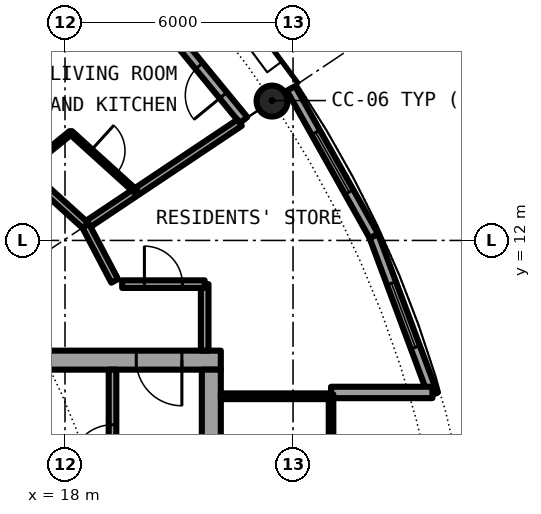
"""IFC4 building model, lengths in metres.
Left out: names, types, materials, properties, quantities, classifications, styles, units other than length and angle.
Written with IfcOpenShell. Run it as: python <this file> out.ifc"""

import sys

from ifc_helpers import new_model, si_unit, direction, frame, frame_2d, origin, origin_2d, place, context, subcontext, project, spatial, rectangle, hollow_circle, extrude, element, fill, save


model = new_model("IFC4")
c1 = context("Model", 3, precision=1e-05, world=origin(), true_north=direction((0.0, 1.0)))
c2 = subcontext(c1, "Body", "Model", "MODEL_VIEW")
j1 = project(units=[si_unit("LENGTHUNIT", "METRE"), si_unit("PLANEANGLEUNIT", "RADIAN")], contexts=[c1])
p1 = place(None, origin())
s1 = spatial("IfcSite", under=j1, at=p1, CompositionType="ELEMENT")
p2 = place(p1, origin())
s2 = spatial("IfcBuilding", under=s1, at=p2, CompositionType="ELEMENT")
p3 = place(p2, frame((0.0, 0.0, 154.35)))
s3 = spatial("IfcBuildingStorey", under=s2, at=p3, CompositionType="ELEMENT", Elevation=154.35)
p4 = place(p3, frame((23.448, 15.667, 0.0), z_axis=(0.0, 0.0, 1.0), x_axis=(1.0, 0.0, 0.0)))
e1 = element("IfcColumn", 1, at=p4, inside=s3, PredefinedType="COLUMN", context=c2, shape_type="SweptSolid", body=[
    extrude(hollow_circle(Radius=0.406, WallThickness=0.04, at=origin_2d()), origin(), (0.0, 0.0, 1.0), 3.05),
])
p5 = place(p3, frame((22.699, 15.167, 0.0), z_axis=(0.0, 0.0, 1.0), x_axis=(-0.634382322723, 0.773019449054, 0.0)))
e2 = element("IfcWall", 2, at=p5, inside=s3, PredefinedType="SOLIDWALL", context=c2, shape_type="SweptSolid", body=[
    extrude(rectangle(XDim=5.352, YDim=0.25, at=frame_2d((2.676, 0.0))), origin(), (0.0, 0.0, 1.0), 2.7),
])
p6 = place(p5, frame((0.841, 0.0, 0.0)))
e3 = element("IfcOpeningElement", 3, at=p6, cuts=e2, PredefinedType="OPENING", context=c2, shape_type="SweptSolid", body=[
    extrude(rectangle(XDim=1.0, YDim=2.2, at=frame_2d((0.5, 1.1))), frame((0.0, 0.135, 0.0), z_axis=(0.0, -1.0, 0.0), x_axis=(1.0, 0.0, 0.0)), (0.0, 0.0, 1.0), 0.27),
])
p7 = place(p5, frame((3.111, 0.0, 0.3)))
e4 = element("IfcOpeningElement", 4, at=p7, cuts=e2, PredefinedType="OPENING", context=c2, shape_type="SweptSolid", body=[
    extrude(rectangle(XDim=1.8, YDim=2.1, at=frame_2d((0.9, 1.05))), frame((0.0, 0.135, 0.0), z_axis=(0.0, -1.0, 0.0), x_axis=(1.0, 0.0, 0.0)), (0.0, 0.0, 1.0), 0.27),
])
p8 = place(p3, frame((27.682, 7.945, 0.0), z_axis=(0.0, 0.0, 1.0), x_axis=(-0.349247811493, 0.937030397675, 0.0)))
e5 = element("IfcWall", 5, at=p8, inside=s3, PredefinedType="SOLIDWALL", context=c2, shape_type="SweptSolid", body=[
    extrude(rectangle(XDim=4.452, YDim=0.25, at=frame_2d((2.226, 0.0))), origin(), (0.0, 0.0, 1.0), 2.7),
])
p9 = place(p8, frame((1.327, 0.0, 0.3)))
e6 = element("IfcOpeningElement", 6, at=p9, cuts=e5, PredefinedType="OPENING", context=c2, shape_type="SweptSolid", body=[
    extrude(rectangle(XDim=1.8, YDim=2.1, at=frame_2d((0.9, 1.05))), frame((0.0, 0.135, 0.0), z_axis=(0.0, -1.0, 0.0), x_axis=(1.0, 0.0, 0.0)), (0.0, 0.0, 1.0), 0.27),
])
p10 = place(p3, frame((26.127, 12.117, 0.0), z_axis=(0.0, 0.0, 1.0), x_axis=(-0.489696356642, 0.871893042919, 0.0)))
e7 = element("IfcWall", 7, at=p10, inside=s3, PredefinedType="SOLIDWALL", context=c2, shape_type="SweptSolid", body=[
    extrude(rectangle(XDim=4.454, YDim=0.25, at=frame_2d((2.227, 0.0))), origin(), (0.0, 0.0, 1.0), 2.7),
])
p11 = place(p10, frame((1.327, 0.0, 0.3)))
e8 = element("IfcOpeningElement", 8, at=p11, cuts=e7, PredefinedType="OPENING", context=c2, shape_type="SweptSolid", body=[
    extrude(rectangle(XDim=1.8, YDim=2.1, at=frame_2d((0.9, 1.05))), frame((0.0, 0.135, 0.0), z_axis=(0.0, -1.0, 0.0), x_axis=(1.0, 0.0, 0.0)), (0.0, 0.0, 1.0), 0.27),
])
p12 = place(p3, frame((25.0, 8.0, 0.0), z_axis=(0.0, 0.0, 1.0), x_axis=(1.0, 0.0, 0.0)))
e9 = element("IfcWall", 9, at=p12, inside=s3, PredefinedType="SOLIDWALL", context=c2, shape_type="SweptSolid", body=[
    extrude(rectangle(XDim=2.667, YDim=0.3, at=frame_2d((1.333, 0.0))), origin(), (0.0, 0.0, 1.0), 2.7),
])
p13 = place(p3, frame((22.1, 8.85, 0.0), z_axis=(0.0, 0.0, 1.0), x_axis=(-1.0, 0.0, 0.0)))
e10 = element("IfcWall", 10, at=p13, inside=s3, PredefinedType="SHEAR", context=c2, shape_type="SweptSolid", body=[
    extrude(rectangle(XDim=13.6, YDim=0.5, at=frame_2d((6.8, 0.0))), origin(), (0.0, 0.0, 1.0), 3.05),
])
p14 = place(p13, frame((1.025, 0.0, 0.0)))
e11 = element("IfcOpeningElement", 11, at=p14, cuts=e10, PredefinedType="OPENING", context=c2, shape_type="SweptSolid", body=[
    extrude(rectangle(XDim=1.2, YDim=2.3, at=frame_2d((0.6, 1.15))), frame((0.0, 0.26, 0.0), z_axis=(0.0, -1.0, 0.0), x_axis=(1.0, 0.0, 0.0)), (0.0, 0.0, 1.0), 0.52),
])
p15 = place(p3, frame((21.85, 8.6, 0.0), z_axis=(0.0, 0.0, 1.0), x_axis=(0.0, -1.0, 0.0)))
e12 = element("IfcWall", 12, at=p15, inside=s3, PredefinedType="SHEAR", context=c2, shape_type="SweptSolid", body=[
    extrude(rectangle(XDim=17.2, YDim=0.5, at=frame_2d((8.6, 0.0))), origin(), (0.0, 0.0, 1.0), 3.05),
])
p16 = place(p15, frame((7.7, 0.0, 0.0)))
e13 = element("IfcOpeningElement", 13, at=p16, cuts=e12, PredefinedType="OPENING", context=c2, shape_type="SweptSolid", body=[
    extrude(rectangle(XDim=1.8, YDim=2.3, at=frame_2d((0.9, 1.15))), frame((0.0, 0.26, 0.0), z_axis=(0.0, -1.0, 0.0), x_axis=(1.0, 0.0, 0.0)), (0.0, 0.0, 1.0), 0.52),
])
p17 = place(p3, frame((19.25, 1.575, 0.0), z_axis=(0.0, 0.0, 1.0), x_axis=(0.0, 1.0, 0.0)))
e14 = element("IfcWall", 14, at=p17, inside=s3, PredefinedType="SOLIDWALL", context=c2, shape_type="SweptSolid", body=[
    extrude(rectangle(XDim=7.025, YDim=0.2, at=frame_2d((3.513, 0.0))), origin(), (0.0, 0.0, 1.0), 2.7),
])
p18 = place(p17, frame((4.475, 0.0, 0.0)))
e15 = element("IfcOpeningElement", 15, at=p18, cuts=e14, PredefinedType="OPENING", context=c2, shape_type="SweptSolid", body=[
    extrude(rectangle(XDim=1.1, YDim=2.3, at=frame_2d((0.55, 1.15))), frame((0.0, 0.11, 0.0), z_axis=(0.0, -1.0, 0.0), x_axis=(1.0, 0.0, 0.0)), (0.0, 0.0, 1.0), 0.22),
])
p19 = place(p3, frame((22.1, 7.9, 0.0), z_axis=(0.0, 0.0, 1.0), x_axis=(1.0, 0.0, 0.0)))
e16 = element("IfcWall", 16, at=p19, inside=s3, PredefinedType="PARTITIONING", context=c2, shape_type="SweptSolid", body=[
    extrude(rectangle(XDim=2.84, YDim=0.15, at=frame_2d((1.42, 0.0))), origin(), (0.0, 0.0, 1.0), 2.7),
])
p20 = place(p3, frame((25.0, -7.95, 0.0), z_axis=(0.0, 0.0, 1.0), x_axis=(0.0, 1.0, 0.0)))
e17 = element("IfcWall", 17, at=p20, inside=s3, PredefinedType="PARTITIONING", context=c2, shape_type="SweptSolid", body=[
    extrude(rectangle(XDim=15.9, YDim=0.12, at=frame_2d((7.95, 0.0))), origin(), (0.0, 0.0, 1.0), 2.7),
])
p21 = place(p20, frame((0.95, 0.0, 0.1)))
e18 = element("IfcOpeningElement", 18, at=p21, cuts=e17, PredefinedType="OPENING", context=c2, shape_type="SweptSolid", body=[
    extrude(rectangle(XDim=14.0, YDim=2.35, at=frame_2d((7.0, 1.175))), frame((0.0, 0.07, 0.0), z_axis=(0.0, -1.0, 0.0), x_axis=(1.0, 0.0, 0.0)), (0.0, 0.0, 1.0), 0.14),
])
p22 = place(p3, frame((21.675, 9.1, 0.0), z_axis=(0.0, 0.0, 1.0), x_axis=(0.0, 1.0, 0.0)))
e19 = element("IfcWall", 19, at=p22, inside=s3, PredefinedType="PARTITIONING", context=c2, shape_type="SweptSolid", body=[
    extrude(rectangle(XDim=1.75, YDim=0.2, at=frame_2d((0.875, 0.0))), origin(), (0.0, 0.0, 1.0), 2.7),
])
p23 = place(p3, frame((16.43, 16.398, 0.0), z_axis=(0.0, 0.0, 1.0), x_axis=(0.707722727509, 0.706490297858, 0.0)))
e20 = element("IfcWall", 20, at=p23, inside=s3, PredefinedType="PARTITIONING", context=c2, shape_type="SweptSolid", body=[
    extrude(rectangle(XDim=3.962, YDim=0.1, at=frame_2d((1.981, 0.0))), origin(), (0.0, 0.0, 1.0), 2.7),
])
p24 = place(p23, frame((1.531, 0.0, 0.0)))
e21 = element("IfcOpeningElement", 21, at=p24, cuts=e20, PredefinedType="OPENING", context=c2, shape_type="SweptSolid", body=[
    extrude(rectangle(XDim=0.9, YDim=2.3, at=frame_2d((0.45, 1.15))), frame((0.0, 0.06, 0.0), z_axis=(0.0, -1.0, 0.0), x_axis=(1.0, 0.0, 0.0)), (0.0, 0.0, 1.0), 0.12),
])
p25 = place(p3, frame((16.936, 13.845, 0.0), z_axis=(0.0, 0.0, 1.0), x_axis=(0.774283039722, 0.632839453889, 0.0)))
e22 = element("IfcWall", 22, at=p25, inside=s3, PredefinedType="PARTITIONING", context=c2, shape_type="SweptSolid", body=[
    extrude(rectangle(XDim=1.569, YDim=0.1, at=frame_2d((0.785, 0.0))), origin(), (0.0, 0.0, 1.0), 2.7),
])
p26 = place(p3, frame((18.542, 12.389, 0.0), z_axis=(0.0, 0.0, 1.0), x_axis=(0.831387096605, 0.55569370664, 0.0)))
e23 = element("IfcWall", 23, at=p26, inside=s3, PredefinedType="PARTITIONING", context=c2, shape_type="SweptSolid", body=[
    extrude(rectangle(XDim=4.875, YDim=0.2, at=frame_2d((2.438, 0.0))), origin(), (0.0, 0.0, 1.0), 2.7),
])
p27 = place(p3, frame((19.504, 10.85, 0.0), z_axis=(0.0, 0.0, 1.0), x_axis=(1.0, 0.0, 0.0)))
e24 = element("IfcWall", 24, at=p27, inside=s3, PredefinedType="PARTITIONING", context=c2, shape_type="SweptSolid", body=[
    extrude(rectangle(XDim=2.171, YDim=0.2, at=frame_2d((1.085, 0.0))), origin(), (0.0, 0.0, 1.0), 2.7),
])
p28 = place(p27, frame((0.585, 0.0, 0.0)))
e25 = element("IfcOpeningElement", 25, at=p28, cuts=e24, PredefinedType="OPENING", context=c2, shape_type="SweptSolid", body=[
    extrude(rectangle(XDim=1.0, YDim=2.3, at=frame_2d((0.5, 1.15))), frame((0.0, 0.11, 0.0), z_axis=(0.0, -1.0, 0.0), x_axis=(1.0, 0.0, 0.0)), (0.0, 0.0, 1.0), 0.22),
])
p29 = place(p3, frame((10.512, 19.667, 0.0), z_axis=(0.0, 0.0, 1.0), x_axis=(0.740947367223, -0.671563101283, 0.0)))
e26 = element("IfcWall", 26, at=p29, inside=s3, PredefinedType="PARTITIONING", context=c2, shape_type="SweptSolid", body=[
    extrude(rectangle(XDim=10.837, YDim=0.2, at=frame_2d((5.419, 0.0))), origin(), (0.0, 0.0, 1.0), 2.7),
])
p30 = place(p29, frame((3.835, 0.0, 0.0)))
e27 = element("IfcOpeningElement", 27, at=p30, cuts=e26, PredefinedType="OPENING", context=c2, shape_type="SweptSolid", body=[
    extrude(rectangle(XDim=1.0, YDim=2.3, at=frame_2d((0.5, 1.15))), frame((0.0, 0.11, 0.0), z_axis=(0.0, -1.0, 0.0), x_axis=(1.0, 0.0, 0.0)), (0.0, 0.0, 1.0), 0.22),
])
p31 = place(p3, frame((18.542, 12.389, 0.0), z_axis=(0.0, 0.0, 1.0), x_axis=(0.465605550524, -0.884992356646, 0.0)))
e28 = element("IfcWall", 28, at=p31, inside=s3, PredefinedType="PARTITIONING", context=c2, shape_type="SweptSolid", body=[
    extrude(rectangle(XDim=1.643, YDim=0.2, at=frame_2d((0.821, 0.0))), origin(), (0.0, 0.0, 1.0), 2.7),
])
p32 = place(p3, frame((18.149, 14.84, 0.0), z_axis=(0.0, 0.0, 1.0), x_axis=(0.741127434804, -0.671364376014, 0.0)))
e29 = element("IfcWall", 29, at=p32, inside=s3, PredefinedType="PARTITIONING", context=c2, shape_type="SweptSolid", body=[
    extrude(rectangle(XDim=2.324, YDim=0.1, at=frame_2d((1.162, 0.0))), origin(), (0.0, 0.0, 1.0), 2.7),
])
p33 = place(p32, frame((0.714, 0.0, 0.0)))
e30 = element("IfcOpeningElement", 30, at=p33, cuts=e29, PredefinedType="OPENING", context=c2, shape_type="SweptSolid", body=[
    extrude(rectangle(XDim=0.9, YDim=2.3, at=frame_2d((0.45, 1.15))), frame((0.0, 0.06, 0.0), z_axis=(0.0, -1.0, 0.0), x_axis=(1.0, 0.0, 0.0)), (0.0, 0.0, 1.0), 0.12),
])
p34 = place(p6, origin())
e31 = element("IfcDoor", 31, at=p34, inside=s3, OperationType="SINGLE_SWING_LEFT", PredefinedType="DOOR", context=c2, shape_type="SweptSolid", body=[
    extrude(rectangle(XDim=1.0, YDim=2.2, at=frame_2d((0.5, 1.1))), frame((0.0, 0.025, 0.0), z_axis=(0.0, -1.0, 0.0), x_axis=(1.0, 0.0, 0.0)), (0.0, 0.0, 1.0), 0.05),
])
fill(e3, e31)
p35 = place(p9, origin())
e32 = element("IfcWindow", 32, at=p35, inside=s3, PartitioningType="SINGLE_PANEL", PredefinedType="WINDOW", context=c2, shape_type="SweptSolid", body=[
    extrude(rectangle(XDim=1.8, YDim=2.1, at=frame_2d((0.9, 1.05))), frame((0.0, 0.03, 0.0), z_axis=(0.0, -1.0, 0.0), x_axis=(1.0, 0.0, 0.0)), (0.0, 0.0, 1.0), 0.06),
])
fill(e6, e32)
p36 = place(p11, origin())
e33 = element("IfcWindow", 33, at=p36, inside=s3, PartitioningType="SINGLE_PANEL", PredefinedType="WINDOW", context=c2, shape_type="SweptSolid", body=[
    extrude(rectangle(XDim=1.8, YDim=2.1, at=frame_2d((0.9, 1.05))), frame((0.0, 0.03, 0.0), z_axis=(0.0, -1.0, 0.0), x_axis=(1.0, 0.0, 0.0)), (0.0, 0.0, 1.0), 0.06),
])
fill(e8, e33)
p37 = place(p18, origin())
e34 = element("IfcDoor", 34, at=p37, inside=s3, OperationType="SINGLE_SWING_LEFT", PredefinedType="DOOR", context=c2, shape_type="SweptSolid", body=[
    extrude(rectangle(XDim=1.1, YDim=2.3, at=frame_2d((0.55, 1.15))), frame((0.0, 0.025, 0.0), z_axis=(0.0, -1.0, 0.0), x_axis=(1.0, 0.0, 0.0)), (0.0, 0.0, 1.0), 0.05),
])
fill(e15, e34)
p38 = place(p14, origin())
e35 = element("IfcDoor", 35, at=p38, inside=s3, OperationType="SINGLE_SWING_RIGHT", PredefinedType="DOOR", context=c2, shape_type="SweptSolid", body=[
    extrude(rectangle(XDim=1.2, YDim=2.3, at=frame_2d((0.6, 1.15))), frame((0.0, 0.025, 0.0), z_axis=(0.0, -1.0, 0.0), x_axis=(1.0, 0.0, 0.0)), (0.0, 0.0, 1.0), 0.05),
])
fill(e11, e35)
p39 = place(p21, origin())
e36 = element("IfcWindow", 36, at=p39, inside=s3, PartitioningType="SINGLE_PANEL", PredefinedType="WINDOW", context=c2, shape_type="SweptSolid", body=[
    extrude(rectangle(XDim=14.0, YDim=2.35, at=frame_2d((7.0, 1.175))), frame((0.0, 0.03, 0.0), z_axis=(0.0, -1.0, 0.0), x_axis=(1.0, 0.0, 0.0)), (0.0, 0.0, 1.0), 0.06),
])
fill(e18, e36)
p40 = place(p33, origin())
e37 = element("IfcDoor", 37, at=p40, inside=s3, OperationType="SINGLE_SWING_RIGHT", PredefinedType="DOOR", context=c2, shape_type="SweptSolid", body=[
    extrude(rectangle(XDim=0.9, YDim=2.3, at=frame_2d((0.45, 1.15))), frame((0.0, 0.025, 0.0), z_axis=(0.0, -1.0, 0.0), x_axis=(1.0, 0.0, 0.0)), (0.0, 0.0, 1.0), 0.05),
])
fill(e30, e37)
p41 = place(p28, origin())
e38 = element("IfcDoor", 38, at=p41, inside=s3, OperationType="SINGLE_SWING_LEFT", PredefinedType="DOOR", context=c2, shape_type="SweptSolid", body=[
    extrude(rectangle(XDim=1.0, YDim=2.3, at=frame_2d((0.5, 1.15))), frame((0.0, 0.025, 0.0), z_axis=(0.0, -1.0, 0.0), x_axis=(1.0, 0.0, 0.0)), (0.0, 0.0, 1.0), 0.05),
])
fill(e25, e38)
save(model, sys.argv[1])
